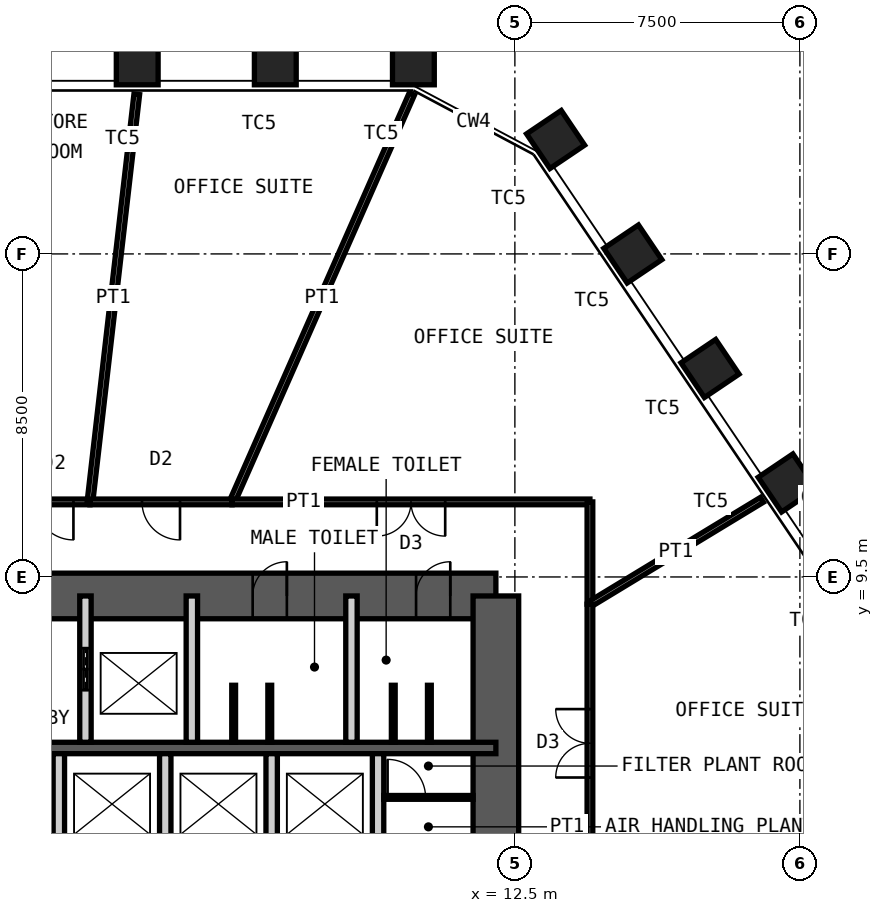
"""IFC4 building model, lengths in metres.
Left out: names, types, materials, properties, quantities, classifications, styles, units other than length and angle.
Written with IfcOpenShell. Run it as: python <this file> out.ifc"""

import sys

from ifc_helpers import new_model, si_unit, direction, frame, frame_2d, origin, origin_2d, place, context, subcontext, project, spatial, rectangle, hollow_rectangle, extrude, element, fill, save


model = new_model("IFC4")
c1 = context("Model", 3, precision=1e-05, world=origin(), true_north=direction((0.0, 1.0)))
c2 = subcontext(c1, "Body", "Model", "MODEL_VIEW")
j1 = project(units=[si_unit("LENGTHUNIT", "METRE"), si_unit("PLANEANGLEUNIT", "RADIAN")], contexts=[c1])
p1 = place(None, origin())
s1 = spatial("IfcSite", under=j1, at=p1, CompositionType="ELEMENT")
p2 = place(p1, origin())
s2 = spatial("IfcBuilding", under=s1, at=p2, CompositionType="ELEMENT")
p3 = place(p2, frame((0.0, 0.0, 197.2)))
s3 = spatial("IfcBuildingStorey", under=s2, at=p3, CompositionType="ELEMENT", Elevation=197.2)
for number, where, z_axis, x_axis in (
    (1, (2.562, 23.0, 0.0), (0.0, 0.0, 1.0), (-1.0, 0.0, 0.0)),
    (2, (6.196, 23.0, 0.0), (0.0, 0.0, 1.0), (-1.0, 0.0, 0.0)),
    (3, (9.829, 23.0, 0.0), (0.0, 0.0, 1.0), (-1.0, 0.0, 0.0)),
    (4, (13.571, 21.01, 0.0), (0.0, 0.0, 1.0), (-0.559, 0.829, 0.0)),
    (5, (15.603, 17.998, 0.0), (0.0, 0.0, 1.0), (-0.559, 0.829, 0.0)),
    (6, (17.635, 14.986, 0.0), (0.0, 0.0, 1.0), (-0.559, 0.829, 0.0)),
    (7, (19.667, 11.973, 0.0), (0.0, 0.0, 1.0), (-0.559, 0.829, 0.0)),
):
    element("IfcColumn", number, at=place(p3, frame(where, z_axis=z_axis, x_axis=x_axis)), inside=s3, PredefinedType="COLUMN", context=c2, shape_type="SweptSolid", body=[
        extrude(hollow_rectangle(XDim=1.1, YDim=1.1, WallThickness=0.07, at=origin_2d()), origin(), (0.0, 0.0, 1.0), 4.2),
    ])
p4 = place(p3, frame((-12.0, 9.0, 0.0), z_axis=(0.0, 0.0, 1.0), x_axis=(1.0, 0.0, 0.0)))
e8 = element("IfcWall", 8, at=p4, inside=s3, PredefinedType="SHEAR", context=c2, shape_type="SweptSolid", body=[
    extrude(rectangle(XDim=24.0, YDim=1.2, at=frame_2d((12.0, 0.0))), origin(), (0.0, 0.0, 1.0), 4.2),
])
p5 = place(p4, frame((10.4, 0.0, 0.0)))
e9 = element("IfcOpeningElement", 9, at=p5, cuts=e8, PredefinedType="OPENING", context=c2, shape_type="SweptSolid", body=[
    extrude(rectangle(XDim=1.0, YDim=2.1, at=frame_2d((0.5, 1.05))), frame((0.0, 0.61, 0.0), z_axis=(0.0, -1.0, 0.0), x_axis=(1.0, 0.0, 0.0)), (0.0, 0.0, 1.0), 1.22),
])
p6 = place(p4, frame((17.6, 0.0, 0.0)))
e10 = element("IfcOpeningElement", 10, at=p6, cuts=e8, PredefinedType="OPENING", context=c2, shape_type="SweptSolid", body=[
    extrude(rectangle(XDim=0.9, YDim=2.1, at=frame_2d((0.45, 1.05))), frame((0.0, 0.61, 0.0), z_axis=(0.0, -1.0, 0.0), x_axis=(1.0, 0.0, 0.0)), (0.0, 0.0, 1.0), 1.22),
])
p7 = place(p4, frame((21.9, 0.0, 0.0)))
e11 = element("IfcOpeningElement", 11, at=p7, cuts=e8, PredefinedType="OPENING", context=c2, shape_type="SweptSolid", body=[
    extrude(rectangle(XDim=0.9, YDim=2.1, at=frame_2d((0.45, 1.05))), frame((0.0, 0.61, 0.0), z_axis=(0.0, -1.0, 0.0), x_axis=(1.0, 0.0, 0.0)), (0.0, 0.0, 1.0), 1.22),
])
p8 = place(p3, frame((12.0, -9.0, 0.0), z_axis=(0.0, 0.0, 1.0), x_axis=(0.0, 1.0, 0.0)))
e12 = element("IfcWall", 12, at=p8, inside=s3, PredefinedType="SHEAR", context=c2, shape_type="SweptSolid", body=[
    extrude(rectangle(XDim=18.0, YDim=1.2, at=frame_2d((9.0, 0.0))), origin(), (0.0, 0.0, 1.0), 4.2),
])
p9 = place(p8, frame((8.1, 0.0, 0.0)))
e13 = element("IfcOpeningElement", 13, at=p9, cuts=e12, PredefinedType="OPENING", context=c2, shape_type="SweptSolid", body=[
    extrude(rectangle(XDim=1.8, YDim=2.1, at=frame_2d((0.9, 1.05))), frame((0.0, 0.61, 0.0), z_axis=(0.0, -1.0, 0.0), x_axis=(1.0, 0.0, 0.0)), (0.0, 0.0, 1.0), 1.22),
])
p10 = place(p3, frame((-12.0, 5.0, 0.0), z_axis=(0.0, 0.0, 1.0), x_axis=(1.0, 0.0, 0.0)))
e14 = element("IfcWall", 14, at=p10, inside=s3, PredefinedType="SHEAR", context=c2, shape_type="SweptSolid", body=[
    extrude(rectangle(XDim=24.0, YDim=0.3, at=frame_2d((12.0, 0.0))), origin(), (0.0, 0.0, 1.0), 4.2),
])
p11 = place(p3, frame((1.2, 5.15, 0.0), z_axis=(0.0, 0.0, 1.0), x_axis=(0.0, 1.0, 0.0)))
e15 = element("IfcWall", 15, at=p11, inside=s3, PredefinedType="PARTITIONING", context=c2, shape_type="SweptSolid", body=[
    extrude(rectangle(XDim=3.85, YDim=0.3, at=frame_2d((1.925, 0.0))), origin(), (0.0, 0.0, 1.0), 3.98),
])
p12 = place(p11, frame((1.375, 0.0, 0.0)))
e16 = element("IfcOpeningElement", 16, at=p12, cuts=e15, PredefinedType="OPENING", context=c2, shape_type="SweptSolid", body=[
    extrude(rectangle(XDim=1.1, YDim=2.4, at=frame_2d((0.55, 1.2))), frame((0.0, 0.16, 0.0), z_axis=(0.0, -1.0, 0.0), x_axis=(1.0, 0.0, 0.0)), (0.0, 0.0, 1.0), 0.32),
])
for number, where, z_axis, x_axis in (
    (17, (4.0, 5.15, 0.0), (0.0, 0.0, 1.0), (0.0, 1.0, 0.0)),
    (18, (8.2, 5.15, 0.0), (0.0, 0.0, 1.0), (0.0, 1.0, 0.0)),
):
    element("IfcWall", number, at=place(p3, frame(where, z_axis=z_axis, x_axis=x_axis)), inside=s3, PredefinedType="PARTITIONING", context=c2, shape_type="SweptSolid", body=[
        extrude(rectangle(XDim=3.85, YDim=0.3, at=frame_2d((1.925, 0.0))), origin(), (0.0, 0.0, 1.0), 3.98),
    ])
for number, where, z_axis, x_axis in (
    (19, (0.5, 2.2, 0.0), (0.0, 0.0, 1.0), (0.0, 1.0, 0.0)),
    (20, (3.3, 2.2, 0.0), (0.0, 0.0, 1.0), (0.0, 1.0, 0.0)),
    (21, (6.1, 2.2, 0.0), (0.0, 0.0, 1.0), (0.0, 1.0, 0.0)),
    (22, (8.9, 2.2, 0.0), (0.0, 0.0, 1.0), (0.0, 1.0, 0.0)),
):
    element("IfcWall", number, at=place(p3, frame(where, z_axis=z_axis, x_axis=x_axis)), inside=s3, PredefinedType="PARTITIONING", context=c2, shape_type="SweptSolid", body=[
        extrude(rectangle(XDim=2.65, YDim=0.3, at=frame_2d((1.325, 0.0))), origin(), (0.0, 0.0, 1.0), 3.98),
    ])
p13 = place(p3, frame((9.05, 3.7, 0.0), z_axis=(0.0, 0.0, 1.0), x_axis=(1.0, 0.0, 0.0)))
e23 = element("IfcWall", 23, at=p13, inside=s3, PredefinedType="PARTITIONING", context=c2, shape_type="SweptSolid", body=[
    extrude(rectangle(XDim=2.35, YDim=0.1, at=frame_2d((1.175, 0.0))), origin(), (0.0, 0.0, 1.0), 3.98),
])
p14 = place(p13, frame((0.1, 0.0, 0.0)))
e24 = element("IfcOpeningElement", 24, at=p14, cuts=e23, PredefinedType="OPENING", context=c2, shape_type="SweptSolid", body=[
    extrude(rectangle(XDim=1.0, YDim=2.4, at=frame_2d((0.5, 1.2))), frame((0.0, 0.06, 0.0), z_axis=(0.0, -1.0, 0.0), x_axis=(1.0, 0.0, 0.0)), (0.0, 0.0, 1.0), 0.12),
])
for number, where, z_axis, x_axis in (
    (25, (5.1, 5.15, 0.0), (0.0, 0.0, 1.0), (0.0, 1.0, 0.0)),
    (26, (6.05, 5.15, 0.0), (0.0, 0.0, 1.0), (0.0, 1.0, 0.0)),
    (27, (9.3, 5.15, 0.0), (0.0, 0.0, 1.0), (0.0, 1.0, 0.0)),
    (28, (10.25, 5.15, 0.0), (0.0, 0.0, 1.0), (0.0, 1.0, 0.0)),
):
    element("IfcWall", number, at=place(p3, frame(where, z_axis=z_axis, x_axis=x_axis)), inside=s3, PredefinedType="PARTITIONING", context=c2, shape_type="SweptSolid", body=[
        extrude(rectangle(XDim=1.5, YDim=0.1, at=frame_2d((0.75, 0.0))), origin(), (0.0, 0.0, 1.0), 2.1),
    ])
p15 = place(p3, frame((9.789, 22.208, 0.0), z_axis=(0.0, 0.0, 1.0), x_axis=(-0.403346052835, -0.9150475188, 0.0)))
e29 = element("IfcWall", 29, at=p15, inside=s3, PredefinedType="PARTITIONING", context=c2, shape_type="SweptSolid", body=[
    extrude(rectangle(XDim=11.73, YDim=0.15, at=frame_2d((5.865, 0.0))), origin(), (0.0, 0.0, 1.0), 2.93),
])
p16 = place(p3, frame((5.058, 11.475, 0.0), z_axis=(0.0, 0.0, 1.0), x_axis=(1.0, 0.0, 0.0)))
e30 = element("IfcWall", 30, at=p16, inside=s3, PredefinedType="PARTITIONING", context=c2, shape_type="SweptSolid", body=[
    extrude(rectangle(XDim=9.417, YDim=0.15, at=frame_2d((4.708, 0.0))), origin(), (0.0, 0.0, 1.0), 4.03),
])
p17 = place(p16, frame((3.809, 0.0, 0.0)))
e31 = element("IfcOpeningElement", 31, at=p17, cuts=e30, PredefinedType="OPENING", context=c2, shape_type="SweptSolid", body=[
    extrude(rectangle(XDim=1.8, YDim=2.4, at=frame_2d((0.9, 1.2))), frame((0.0, 0.085, 0.0), z_axis=(0.0, -1.0, 0.0), x_axis=(1.0, 0.0, 0.0)), (0.0, 0.0, 1.0), 0.17),
])
p18 = place(p3, frame((14.475, 11.475, 0.0), z_axis=(0.0, 0.0, 1.0), x_axis=(0.0, -1.0, 0.0)))
e32 = element("IfcWall", 32, at=p18, inside=s3, PredefinedType="PARTITIONING", context=c2, shape_type="SweptSolid", body=[
    extrude(rectangle(XDim=2.692, YDim=0.15, at=frame_2d((1.346, 0.0))), origin(), (0.0, 0.0, 1.0), 4.03),
])
p19 = place(p3, frame((19.001, 11.53, 0.0), z_axis=(0.0, 0.0, 1.0), x_axis=(-0.854906581035, -0.518781975114, 0.0)))
e33 = element("IfcWall", 33, at=p19, inside=s3, PredefinedType="PARTITIONING", context=c2, shape_type="SweptSolid", body=[
    extrude(rectangle(XDim=5.294, YDim=0.15, at=frame_2d((2.647, 0.0))), origin(), (0.0, 0.0, 1.0), 3.43),
])
p20 = place(p3, frame((14.475, 8.783, 0.0), z_axis=(0.0, 0.0, 1.0), x_axis=(0.0, -1.0, 0.0)))
e34 = element("IfcWall", 34, at=p20, inside=s3, PredefinedType="PARTITIONING", context=c2, shape_type="SweptSolid", body=[
    extrude(rectangle(XDim=7.321, YDim=0.15, at=frame_2d((3.66, 0.0))), origin(), (0.0, 0.0, 1.0), 4.03),
])
p21 = place(p20, frame((2.76, 0.0, 0.0)))
e35 = element("IfcOpeningElement", 35, at=p21, cuts=e34, PredefinedType="OPENING", context=c2, shape_type="SweptSolid", body=[
    extrude(rectangle(XDim=1.8, YDim=2.4, at=frame_2d((0.9, 1.2))), frame((0.0, 0.085, 0.0), z_axis=(0.0, -1.0, 0.0), x_axis=(1.0, 0.0, 0.0)), (0.0, 0.0, 1.0), 0.17),
])
p22 = place(p3, frame((-0.551, 11.475, 0.0), z_axis=(0.0, 0.0, 1.0), x_axis=(1.0, 0.0, 0.0)))
e36 = element("IfcWall", 36, at=p22, inside=s3, PredefinedType="PARTITIONING", context=c2, shape_type="SweptSolid", body=[
    extrude(rectangle(XDim=1.87, YDim=0.15, at=frame_2d((0.935, 0.0))), origin(), (0.0, 0.0, 1.0), 4.03),
])
p23 = place(p22, frame((0.435, 0.0, 0.0)))
e37 = element("IfcOpeningElement", 37, at=p23, cuts=e36, PredefinedType="OPENING", context=c2, shape_type="SweptSolid", body=[
    extrude(rectangle(XDim=1.0, YDim=2.4, at=frame_2d((0.5, 1.2))), frame((0.0, 0.085, 0.0), z_axis=(0.0, -1.0, 0.0), x_axis=(1.0, 0.0, 0.0)), (0.0, 0.0, 1.0), 0.17),
])
p24 = place(p3, frame((2.551, 22.201, 0.0), z_axis=(0.0, 0.0, 1.0), x_axis=(-0.11415373111, -0.993463097288, 0.0)))
e38 = element("IfcWall", 38, at=p24, inside=s3, PredefinedType="PARTITIONING", context=c2, shape_type="SweptSolid", body=[
    extrude(rectangle(XDim=10.796, YDim=0.15, at=frame_2d((5.398, 0.0))), origin(), (0.0, 0.0, 1.0), 3.43),
])
p25 = place(p3, frame((1.318, 11.475, 0.0), z_axis=(0.0, 0.0, 1.0), x_axis=(1.0, 0.0, 0.0)))
e39 = element("IfcWall", 39, at=p25, inside=s3, PredefinedType="PARTITIONING", context=c2, shape_type="SweptSolid", body=[
    extrude(rectangle(XDim=3.74, YDim=0.15, at=frame_2d((1.87, 0.0))), origin(), (0.0, 0.0, 1.0), 4.03),
])
p26 = place(p25, frame((1.37, 0.0, 0.0)))
e40 = element("IfcOpeningElement", 40, at=p26, cuts=e39, PredefinedType="OPENING", context=c2, shape_type="SweptSolid", body=[
    extrude(rectangle(XDim=1.0, YDim=2.4, at=frame_2d((0.5, 1.2))), frame((0.0, 0.085, 0.0), z_axis=(0.0, -1.0, 0.0), x_axis=(1.0, 0.0, 0.0)), (0.0, 0.0, 1.0), 0.17),
])
p27 = place(p6, origin())
e41 = element("IfcDoor", 41, at=p27, inside=s3, OperationType="SINGLE_SWING_LEFT", PredefinedType="DOOR", context=c2, shape_type="SweptSolid", body=[
    extrude(rectangle(XDim=0.9, YDim=2.1, at=frame_2d((0.45, 1.05))), frame((0.0, 0.025, 0.0), z_axis=(0.0, -1.0, 0.0), x_axis=(1.0, 0.0, 0.0)), (0.0, 0.0, 1.0), 0.05),
])
fill(e10, e41)
p28 = place(p7, origin())
e42 = element("IfcDoor", 42, at=p28, inside=s3, OperationType="SINGLE_SWING_LEFT", PredefinedType="DOOR", context=c2, shape_type="SweptSolid", body=[
    extrude(rectangle(XDim=0.9, YDim=2.1, at=frame_2d((0.45, 1.05))), frame((0.0, 0.025, 0.0), z_axis=(0.0, -1.0, 0.0), x_axis=(1.0, 0.0, 0.0)), (0.0, 0.0, 1.0), 0.05),
])
fill(e11, e42)
p29 = place(p12, origin())
e43 = element("IfcDoor", 43, at=p29, inside=s3, OperationType="DOUBLE_DOOR_SLIDING", PredefinedType="DOOR", context=c2, shape_type="SweptSolid", body=[
    extrude(rectangle(XDim=1.1, YDim=2.4, at=frame_2d((0.55, 1.2))), frame((0.0, 0.025, 0.0), z_axis=(0.0, -1.0, 0.0), x_axis=(1.0, 0.0, 0.0)), (0.0, 0.0, 1.0), 0.05),
])
fill(e16, e43)
p30 = place(p14, origin())
e44 = element("IfcDoor", 44, at=p30, inside=s3, OperationType="SINGLE_SWING_RIGHT", PredefinedType="DOOR", context=c2, shape_type="SweptSolid", body=[
    extrude(rectangle(XDim=1.0, YDim=2.4, at=frame_2d((0.5, 1.2))), frame((0.0, 0.025, 0.0), z_axis=(0.0, -1.0, 0.0), x_axis=(1.0, 0.0, 0.0)), (0.0, 0.0, 1.0), 0.05),
])
fill(e24, e44)
p31 = place(p17, origin())
e45 = element("IfcDoor", 45, at=p31, inside=s3, OperationType="DOUBLE_DOOR_DOUBLE_SWING", PredefinedType="DOOR", context=c2, shape_type="SweptSolid", body=[
    extrude(rectangle(XDim=1.8, YDim=2.4, at=frame_2d((0.9, 1.2))), frame((0.0, 0.025, 0.0), z_axis=(0.0, -1.0, 0.0), x_axis=(1.0, 0.0, 0.0)), (0.0, 0.0, 1.0), 0.05),
])
fill(e31, e45)
p32 = place(p21, origin())
e46 = element("IfcDoor", 46, at=p32, inside=s3, OperationType="DOUBLE_DOOR_DOUBLE_SWING", PredefinedType="DOOR", context=c2, shape_type="SweptSolid", body=[
    extrude(rectangle(XDim=1.8, YDim=2.4, at=frame_2d((0.9, 1.2))), frame((0.0, 0.025, 0.0), z_axis=(0.0, -1.0, 0.0), x_axis=(1.0, 0.0, 0.0)), (0.0, 0.0, 1.0), 0.05),
])
fill(e35, e46)
p33 = place(p23, origin())
e47 = element("IfcDoor", 47, at=p33, inside=s3, OperationType="SINGLE_SWING_RIGHT", PredefinedType="DOOR", context=c2, shape_type="SweptSolid", body=[
    extrude(rectangle(XDim=1.0, YDim=2.4, at=frame_2d((0.5, 1.2))), frame((0.0, 0.025, 0.0), z_axis=(0.0, -1.0, 0.0), x_axis=(1.0, 0.0, 0.0)), (0.0, 0.0, 1.0), 0.05),
])
fill(e37, e47)
p34 = place(p26, origin())
e48 = element("IfcDoor", 48, at=p34, inside=s3, OperationType="SINGLE_SWING_RIGHT", PredefinedType="DOOR", context=c2, shape_type="SweptSolid", body=[
    extrude(rectangle(XDim=1.0, YDim=2.4, at=frame_2d((0.5, 1.2))), frame((0.0, 0.025, 0.0), z_axis=(0.0, -1.0, 0.0), x_axis=(1.0, 0.0, 0.0)), (0.0, 0.0, 1.0), 0.05),
])
fill(e40, e48)
save(model, sys.argv[1])
